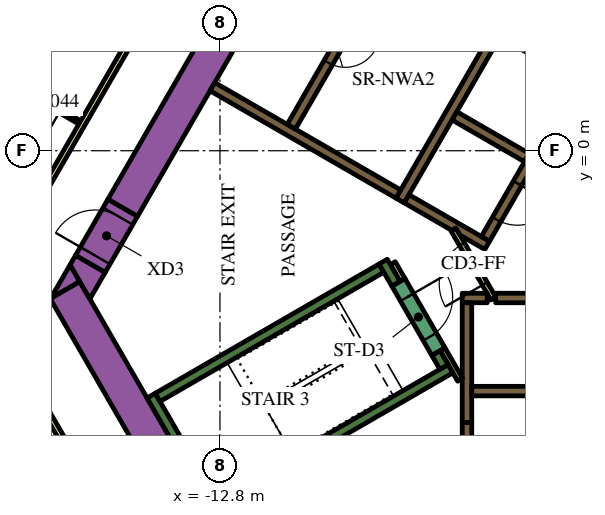
"""IFC4 building model, lengths in metres.
Left out: names, types, materials, properties, quantities, classifications, styles, units other than length and angle.
Written with IfcOpenShell. Run it as: python <this file> out.ifc"""

import sys

from ifc_helpers import new_model, si_unit, direction, frame, frame_2d, origin, place, context, subcontext, project, spatial, polyline, rectangle, outline, extrude, element, fill, save


model = new_model("IFC4")
c1 = context("Model", 3, precision=1e-05, world=origin(), true_north=direction((0.0, 1.0)))
c2 = subcontext(c1, "Body", "Model", "MODEL_VIEW")
j1 = project(units=[si_unit("LENGTHUNIT", "METRE"), si_unit("PLANEANGLEUNIT", "RADIAN")], contexts=[c1])
p1 = place(None, origin())
s1 = spatial("IfcSite", under=j1, at=p1, CompositionType="ELEMENT")
p2 = place(p1, origin())
s2 = spatial("IfcBuilding", under=s1, at=p2, CompositionType="ELEMENT")
p3 = place(p2, frame((0.0, 0.0, 95.4)))
s3 = spatial("IfcBuildingStorey", under=s2, at=p3, CompositionType="ELEMENT", Elevation=95.4)
p4 = place(p3, frame((-15.36, -1.503, 0.0), z_axis=(0.0, 0.0, 1.0), x_axis=(0.50000389221, 0.866023156604, 0.0)))
e1 = element("IfcWall", 1, at=p4, inside=s3, PredefinedType="SOLIDWALL", context=c2, shape_type="SweptSolid", body=[
    extrude(rectangle(XDim=21.0, YDim=0.9, at=frame_2d((10.5, 0.0))), origin(), (0.0, 0.0, 1.0), 3.9),
])
p5 = place(p3, frame((-12.134, -11.883, 0.0), z_axis=(0.0, 0.0, 1.0), x_axis=(-0.500005339912, 0.866022320763, 0.0)))
e2 = element("IfcWall", 2, at=p5, inside=s3, PredefinedType="SOLIDWALL", context=c2, shape_type="SweptSolid", body=[
    extrude(rectangle(XDim=9.488, YDim=0.9, at=frame_2d((4.744, 0.0))), origin(), (0.0, 0.0, 1.0), 3.9),
])
p6 = place(p3, origin())
e3 = element("IfcWall", 3, at=p6, inside=s3, PredefinedType="SOLIDWALL", context=c2, shape_type="SweptSolid", body=[
    extrude(outline(polyline([(-16.489, -3.44), (-17.251, -3.88), (-16.743, -3.0), (-16.489, -3.44)])), origin(), (0.0, 0.0, 1.0), 3.9),
])
e4 = element("IfcWall", 4, at=p6, inside=s3, PredefinedType="SOLIDWALL", context=c2, shape_type="SweptSolid", body=[
    extrude(outline(polyline([(-15.82, -3.201), (-16.223, -3.9), (-16.743, -3.0), (-16.599, -2.751), (-15.82, -3.201)])), origin(), (0.0, 0.0, 1.0), 3.9),
])
p7 = place(p3, frame((-12.885, -9.431, 0.0), z_axis=(0.0, 0.0, 1.0), x_axis=(-0.500020560727, 0.866013532718, 0.0)))
e5 = element("IfcWall", 5, at=p7, inside=s3, PredefinedType="SOLIDWALL", context=c2, shape_type="SweptSolid", body=[
    extrude(rectangle(XDim=3.45, YDim=0.25, at=frame_2d((1.725, 0.0))), origin(), (0.0, 0.0, 1.0), 3.9),
])
p8 = place(p3, frame((-14.44, -6.49, 0.0), z_axis=(0.0, 0.0, 1.0), x_axis=(0.866022966069, 0.500004222222, 0.0)))
e6 = element("IfcWall", 6, at=p8, inside=s3, PredefinedType="SOLIDWALL", context=c2, shape_type="SweptSolid", body=[
    extrude(rectangle(XDim=6.8, YDim=0.25, at=frame_2d((3.4, 0.0))), origin(), (0.0, 0.0, 1.0), 3.9),
])
p9 = place(p3, frame((-8.168, -3.503, 0.0), z_axis=(0.0, 0.0, 1.0), x_axis=(-0.499952099219, 0.866053057547, 0.0)))
e7 = element("IfcWall", 7, at=p9, inside=s3, PredefinedType="SOLIDWALL", context=c2, shape_type="SweptSolid", body=[
    extrude(rectangle(XDim=0.675, YDim=0.25, at=frame_2d((0.337, 0.0))), origin(), (0.0, 0.0, 1.0), 3.9),
])
p10 = place(p3, frame((-12.84, -9.261, 0.0), z_axis=(0.0, 0.0, 1.0), x_axis=(0.866016039709, 0.500016218704, 0.0)))
e8 = element("IfcWall", 8, at=p10, inside=s3, PredefinedType="SOLIDWALL", context=c2, shape_type="SweptSolid", body=[
    extrude(rectangle(XDim=7.05, YDim=0.25, at=frame_2d((3.525, 0.0))), origin(), (0.0, 0.0, 1.0), 3.9),
])
p11 = place(p3, frame((-6.905, -5.69, 0.0), z_axis=(0.0, 0.0, 1.0), x_axis=(-0.500402024738, 0.865793170242, 0.0)))
e9 = element("IfcWall", 9, at=p11, inside=s3, PredefinedType="SOLIDWALL", context=c2, shape_type="SweptSolid", body=[
    extrude(rectangle(XDim=0.425, YDim=0.25, at=frame_2d((0.212, 0.0))), origin(), (0.0, 0.0, 1.0), 3.9),
])
p12 = place(p3, frame((-5.545, -3.875, 0.0), z_axis=(0.0, 0.0, 1.0), x_axis=(1.0, 0.0, 0.0)))
e10 = element("IfcWall", 10, at=p12, inside=s3, PredefinedType="SOLIDWALL", context=c2, shape_type="SweptSolid", body=[
    extrude(rectangle(XDim=11.97, YDim=0.25, at=frame_2d((5.985, 0.0))), origin(), (0.0, 0.0, 1.0), 3.9),
])
p13 = place(p3, frame((-6.425, -3.875, 0.0), z_axis=(0.0, 0.0, 1.0), x_axis=(1.0, 0.0, 0.0)))
e11 = element("IfcWall", 11, at=p13, inside=s3, PredefinedType="SOLIDWALL", context=c2, shape_type="SweptSolid", body=[
    extrude(rectangle(XDim=0.658, YDim=0.25, at=frame_2d((0.329, 0.0))), origin(), (0.0, 0.0, 1.0), 3.9),
])
p14 = place(p3, frame((-6.3, -4.0, 0.0), z_axis=(0.0, 0.0, 1.0), x_axis=(0.0, -1.0, 0.0)))
e12 = element("IfcWall", 12, at=p14, inside=s3, PredefinedType="SOLIDWALL", context=c2, shape_type="SweptSolid", body=[
    extrude(rectangle(XDim=3.154, YDim=0.25, at=frame_2d((1.577, 0.0))), origin(), (0.0, 0.0, 1.0), 3.9),
])
p15 = place(p3, frame((-8.06, -1.311, 0.0), z_axis=(0.0, 0.0, 1.0), x_axis=(0.50000273126, 0.866023826885, 0.0)))
e13 = element("IfcWall", 13, at=p15, inside=s3, PredefinedType="SOLIDWALL", context=c2, shape_type="SweptSolid", body=[
    extrude(rectangle(XDim=10.33, YDim=0.25, at=frame_2d((5.165, 0.0))), origin(), (0.0, 0.0, 1.0), 3.9),
])
for number, where, z_axis, x_axis in (
    (14, (-5.369, 3.1, 0.0), (0.0, 0.0, 1.0), (0.866, -0.5, 0.0)),
    (15, (-4.724, -0.182, 0.0), (0.0, 0.0, 1.0), (-0.866, 0.5, 0.0)),
):
    element("IfcWall", number, at=place(p3, frame(where, z_axis=z_axis, x_axis=x_axis)), inside=s3, PredefinedType="SOLIDWALL", context=c2, shape_type="SweptSolid", body=[
        extrude(rectangle(XDim=2.2, YDim=0.25, at=frame_2d((1.1, 0.0))), origin(), (0.0, 0.0, 1.0), 3.9),
    ])
e16 = element("IfcWall", 16, at=p6, inside=s3, PredefinedType="SOLIDWALL", context=c2, shape_type="SweptSolid", body=[
    extrude(outline(polyline([(-5.922, -2.257), (-5.922, -2.257), (-5.705, -2.382), (-5.83, -2.598), (-6.483, -2.221), (-6.591, -2.033), (-6.591, -2.033), (-6.7, -2.096), (-7.952, -1.373), (-7.827, -1.156), (-5.922, -2.257)])), origin(), (0.0, 0.0, 1.0), 3.9),
])
p16 = place(p3, frame((-8.106, -1.14, 0.0), z_axis=(0.0, 0.0, 1.0), x_axis=(-0.866000643155, 0.500042884217, 0.0)))
e17 = element("IfcWall", 17, at=p16, inside=s3, PredefinedType="SOLIDWALL", context=c2, shape_type="SweptSolid", body=[
    extrude(rectangle(XDim=5.65, YDim=0.25, at=frame_2d((2.825, 0.0))), origin(), (0.0, 0.0, 1.0), 3.9),
])
p17 = place(p3, frame((-6.48, -6.027, 0.0), z_axis=(0.0, 0.0, 1.0), x_axis=(-0.499927229454, 0.866067413802, 0.0)))
e18 = element("IfcWall", 18, at=p17, inside=s3, PredefinedType="PARTITIONING", context=c2, shape_type="SweptSolid", body=[
    extrude(rectangle(XDim=0.929, YDim=0.15, at=frame_2d((0.464, 0.0))), origin(), (0.0, 0.0, 1.0), 3.9),
])
p18 = place(p3, frame((-8.252, -2.958, 0.0), z_axis=(0.0, 0.0, 1.0), x_axis=(0.500174715838, -0.865924508047, 0.0)))
e19 = element("IfcWall", 19, at=p18, inside=s3, PredefinedType="PARTITIONING", context=c2, shape_type="SweptSolid", body=[
    extrude(rectangle(XDim=0.514, YDim=0.15, at=frame_2d((0.257, 0.0))), origin(), (0.0, 0.0, 1.0), 2.75),
])
p19 = place(p3, frame((-6.175, -6.325, 0.0), z_axis=(0.0, 0.0, 1.0), x_axis=(1.0, 0.0, 0.0)))
e20 = element("IfcWall", 20, at=p19, inside=s3, PredefinedType="SOLIDWALL", context=c2, shape_type="SweptSolid", body=[
    extrude(rectangle(XDim=12.35, YDim=0.25, at=frame_2d((6.175, 0.0))), origin(), (0.0, 0.0, 1.0), 3.9),
])
p20 = place(p19, frame((3.205, 0.0, 0.0)))
e21 = element("IfcOpeningElement", 21, at=p20, cuts=e20, PredefinedType="OPENING", context=c2, shape_type="SweptSolid", body=[
    extrude(rectangle(XDim=0.9, YDim=2.1, at=frame_2d((0.45, 1.05))), frame((0.0, 0.135, 0.0), z_axis=(0.0, -1.0, 0.0), x_axis=(1.0, 0.0, 0.0)), (0.0, 0.0, 1.0), 0.27),
])
p21 = place(p19, frame((8.145, 0.0, 0.0)))
e22 = element("IfcOpeningElement", 22, at=p21, cuts=e20, PredefinedType="OPENING", context=c2, shape_type="SweptSolid", body=[
    extrude(rectangle(XDim=1.1, YDim=2.1, at=frame_2d((0.55, 1.05))), frame((0.0, 0.135, 0.0), z_axis=(0.0, -1.0, 0.0), x_axis=(1.0, 0.0, 0.0)), (0.0, 0.0, 1.0), 0.27),
])
p22 = place(p19, frame((10.665, 0.0, 0.0)))
e23 = element("IfcOpeningElement", 23, at=p22, cuts=e20, PredefinedType="OPENING", context=c2, shape_type="SweptSolid", body=[
    extrude(rectangle(XDim=1.1, YDim=2.1, at=frame_2d((0.55, 1.05))), frame((0.0, 0.135, 0.0), z_axis=(0.0, -1.0, 0.0), x_axis=(1.0, 0.0, 0.0)), (0.0, 0.0, 1.0), 0.27),
])
p23 = place(p3, frame((-6.008, 9.144, 0.0), z_axis=(0.0, 0.0, 1.0), x_axis=(-0.500006956611, -0.866021387346, 0.0)))
e24 = element("IfcWall", 24, at=p23, inside=s3, PredefinedType="SOLIDWALL", context=c2, shape_type="SweptSolid", body=[
    extrude(rectangle(XDim=9.83, YDim=0.25, at=frame_2d((4.915, 0.0))), origin(), (0.0, 0.0, 1.0), 3.9),
])
p24 = place(p23, frame((6.985, 0.0, 0.0)))
e25 = element("IfcOpeningElement", 25, at=p24, cuts=e24, PredefinedType="OPENING", context=c2, shape_type="SweptSolid", body=[
    extrude(rectangle(XDim=0.9, YDim=2.1, at=frame_2d((0.45, 1.05))), frame((0.0, 0.135, 0.0), z_axis=(0.0, -1.0, 0.0), x_axis=(1.0, 0.0, 0.0)), (0.0, 0.0, 1.0), 0.27),
])
p25 = place(p3, frame((-0.898, 6.194, 0.0), z_axis=(0.0, 0.0, 1.0), x_axis=(-0.499996202215, -0.866027596426, 0.0)))
e26 = element("IfcWall", 26, at=p25, inside=s3, PredefinedType="SOLIDWALL", context=c2, shape_type="SweptSolid", body=[
    extrude(rectangle(XDim=9.83, YDim=0.25, at=frame_2d((4.915, 0.0))), origin(), (0.0, 0.0, 1.0), 3.9),
])
p26 = place(p25, frame((0.585, 0.0, 0.0)))
e27 = element("IfcOpeningElement", 27, at=p26, cuts=e26, PredefinedType="OPENING", context=c2, shape_type="SweptSolid", body=[
    extrude(rectangle(XDim=1.1, YDim=2.1, at=frame_2d((0.55, 1.05))), frame((0.0, 0.135, 0.0), z_axis=(0.0, -1.0, 0.0), x_axis=(1.0, 0.0, 0.0)), (0.0, 0.0, 1.0), 0.27),
])
p27 = place(p25, frame((3.105, 0.0, 0.0)))
e28 = element("IfcOpeningElement", 28, at=p27, cuts=e26, PredefinedType="OPENING", context=c2, shape_type="SweptSolid", body=[
    extrude(rectangle(XDim=1.1, YDim=2.1, at=frame_2d((0.55, 1.05))), frame((0.0, 0.135, 0.0), z_axis=(0.0, -1.0, 0.0), x_axis=(1.0, 0.0, 0.0)), (0.0, 0.0, 1.0), 0.27),
])
p28 = place(p25, frame((5.625, 0.0, 0.0)))
e29 = element("IfcOpeningElement", 29, at=p28, cuts=e26, PredefinedType="OPENING", context=c2, shape_type="SweptSolid", body=[
    extrude(rectangle(XDim=1.1, YDim=2.1, at=frame_2d((0.55, 1.05))), frame((0.0, 0.135, 0.0), z_axis=(0.0, -1.0, 0.0), x_axis=(1.0, 0.0, 0.0)), (0.0, 0.0, 1.0), 0.27),
])
p29 = place(p25, frame((8.145, 0.0, 0.0)))
e30 = element("IfcOpeningElement", 30, at=p29, cuts=e26, PredefinedType="OPENING", context=c2, shape_type="SweptSolid", body=[
    extrude(rectangle(XDim=1.1, YDim=2.1, at=frame_2d((0.55, 1.05))), frame((0.0, 0.135, 0.0), z_axis=(0.0, -1.0, 0.0), x_axis=(1.0, 0.0, 0.0)), (0.0, 0.0, 1.0), 0.27),
])
p30 = place(p3, frame((-8.103, -3.466, 0.0), z_axis=(0.0, 0.0, 1.0), x_axis=(0.500078061341, -0.865980330357, 0.0)))
e31 = element("IfcWall", 31, at=p30, inside=s3, PredefinedType="SOLIDWALL", context=c2, shape_type="SweptSolid", body=[
    extrude(rectangle(XDim=2.1, YDim=0.4, at=frame_2d((1.05, 0.0))), origin(), (0.0, 0.0, 1.0), 3.9),
])
p31 = place(p30, frame((0.45, 0.0, 0.0)))
e32 = element("IfcOpeningElement", 32, at=p31, cuts=e31, PredefinedType="OPENING", context=c2, shape_type="SweptSolid", body=[
    extrude(rectangle(XDim=1.2, YDim=2.1, at=frame_2d((0.6, 1.05))), frame((0.0, 0.21, 0.0), z_axis=(0.0, -1.0, 0.0), x_axis=(1.0, 0.0, 0.0)), (0.0, 0.0, 1.0), 0.42),
])
p32 = place(p3, frame((-6.3, -7.154, 0.0), z_axis=(0.0, 0.0, 1.0), x_axis=(0.0, -1.0, 0.0)))
e33 = element("IfcWall", 33, at=p32, inside=s3, PredefinedType="SOLIDWALL", context=c2, shape_type="SweptSolid", body=[
    extrude(rectangle(XDim=1.8, YDim=0.25, at=frame_2d((0.9, 0.0))), origin(), (0.0, 0.0, 1.0), 3.9),
])
p33 = place(p32, frame((0.45, 0.0, 0.0)))
e34 = element("IfcOpeningElement", 34, at=p33, cuts=e33, PredefinedType="OPENING", context=c2, shape_type="SweptSolid", body=[
    extrude(rectangle(XDim=0.9, YDim=2.1, at=frame_2d((0.45, 1.05))), frame((0.0, 0.135, 0.0), z_axis=(0.0, -1.0, 0.0), x_axis=(1.0, 0.0, 0.0)), (0.0, 0.0, 1.0), 0.27),
])
p34 = place(p3, frame((-5.606, -3.89, 0.0), z_axis=(0.0, 0.0, 1.0), x_axis=(-0.500027713859, 0.866009402589, 0.0)))
e35 = element("IfcWall", 35, at=p34, inside=s3, PredefinedType="PARTITIONING", context=c2, shape_type="SweptSolid", body=[
    extrude(rectangle(XDim=2.1, YDim=0.15, at=frame_2d((1.05, 0.0))), origin(), (0.0, 0.0, 1.0), 2.75),
])
p35 = place(p34, frame((0.45, 0.0, 0.0)))
e36 = element("IfcOpeningElement", 36, at=p35, cuts=e35, PredefinedType="OPENING", context=c2, shape_type="SweptSolid", body=[
    extrude(rectangle(XDim=1.2, YDim=2.1, at=frame_2d((0.6, 1.05))), frame((0.0, 0.085, 0.0), z_axis=(0.0, -1.0, 0.0), x_axis=(1.0, 0.0, 0.0)), (0.0, 0.0, 1.0), 0.17),
])
p36 = place(p3, frame((-16.209, -2.976, 0.0), z_axis=(0.0, 0.0, 1.0), x_axis=(0.499954529098, 0.86605165483, 0.0)))
e37 = element("IfcWall", 37, at=p36, inside=s3, PredefinedType="SOLIDWALL", context=c2, shape_type="SweptSolid", body=[
    extrude(rectangle(XDim=1.7, YDim=0.9, at=frame_2d((0.85, 0.0))), origin(), (0.0, 0.0, 1.0), 3.9),
])
p37 = place(p36, frame((0.25, 0.0, 0.0)))
e38 = element("IfcOpeningElement", 38, at=p37, cuts=e37, PredefinedType="OPENING", context=c2, shape_type="SweptSolid", body=[
    extrude(rectangle(XDim=1.2, YDim=2.1, at=frame_2d((0.6, 1.05))), frame((0.0, 0.46, 0.0), z_axis=(0.0, -1.0, 0.0), x_axis=(1.0, 0.0, 0.0)), (0.0, 0.0, 1.0), 0.92),
])
p38 = place(p3, frame((-19.081, -3.9, 0.0), z_axis=(0.0, 0.0, 1.0), x_axis=(0.499998313975, 0.866026377209, 0.0)))
e39 = element("IfcWall", 39, at=p38, inside=s3, PredefinedType="PARTITIONING", context=c2, shape_type="SweptSolid", body=[
    extrude(rectangle(XDim=25.766, YDim=0.15, at=frame_2d((12.883, 0.0))), origin(), (0.0, 0.0, 1.0), 2.75),
])
p39 = place(p38, frame((19.306, 0.0, 0.0)))
e40 = element("IfcOpeningElement", 40, at=p39, cuts=e39, PredefinedType="OPENING", context=c2, shape_type="SweptSolid", body=[
    extrude(rectangle(XDim=1.0, YDim=2.1, at=frame_2d((0.5, 1.05))), frame((0.0, 0.085, 0.0), z_axis=(0.0, -1.0, 0.0), x_axis=(1.0, 0.0, 0.0)), (0.0, 0.0, 1.0), 0.17),
])
p40 = place(p38, frame((17.144, 0.0, 0.0)))
e41 = element("IfcOpeningElement", 41, at=p40, cuts=e39, PredefinedType="OPENING", context=c2, shape_type="SweptSolid", body=[
    extrude(rectangle(XDim=0.9, YDim=2.1, at=frame_2d((0.45, 1.05))), frame((0.0, 0.085, 0.0), z_axis=(0.0, -1.0, 0.0), x_axis=(1.0, 0.0, 0.0)), (0.0, 0.0, 1.0), 0.17),
])
p41 = place(p38, frame((9.955, 0.0, 0.0)))
e42 = element("IfcOpeningElement", 42, at=p41, cuts=e39, PredefinedType="OPENING", context=c2, shape_type="SweptSolid", body=[
    extrude(rectangle(XDim=1.1, YDim=2.1, at=frame_2d((0.55, 1.05))), frame((0.0, 0.085, 0.0), z_axis=(0.0, -1.0, 0.0), x_axis=(1.0, 0.0, 0.0)), (0.0, 0.0, 1.0), 0.17),
])
p42 = place(p38, frame((8.648, 0.0, 0.0)))
e43 = element("IfcOpeningElement", 43, at=p42, cuts=e39, PredefinedType="OPENING", context=c2, shape_type="SweptSolid", body=[
    extrude(rectangle(XDim=1.0, YDim=2.1, at=frame_2d((0.5, 1.05))), frame((0.0, 0.085, 0.0), z_axis=(0.0, -1.0, 0.0), x_axis=(1.0, 0.0, 0.0)), (0.0, 0.0, 1.0), 0.17),
])
p43 = place(p38, frame((1.553, 0.0, 0.0)))
e44 = element("IfcOpeningElement", 44, at=p43, cuts=e39, PredefinedType="OPENING", context=c2, shape_type="SweptSolid", body=[
    extrude(rectangle(XDim=0.9, YDim=2.1, at=frame_2d((0.45, 1.05))), frame((0.0, 0.085, 0.0), z_axis=(0.0, -1.0, 0.0), x_axis=(1.0, 0.0, 0.0)), (0.0, 0.0, 1.0), 0.17),
])
p44 = place(p3, frame((-16.412, -8.523, 0.0), z_axis=(0.0, 0.0, 1.0), x_axis=(-0.500001929737, 0.866024289647, 0.0)))
e45 = element("IfcWall", 45, at=p44, inside=s3, PredefinedType="PARTITIONING", context=c2, shape_type="SweptSolid", body=[
    extrude(rectangle(XDim=5.268, YDim=0.15, at=frame_2d((2.634, 0.0))), origin(), (0.0, 0.0, 1.0), 2.75),
])
p45 = place(p44, frame((4.088, 0.0, 0.0)))
e46 = element("IfcOpeningElement", 46, at=p45, cuts=e45, PredefinedType="OPENING", context=c2, shape_type="SweptSolid", body=[
    extrude(rectangle(XDim=1.0, YDim=2.1, at=frame_2d((0.5, 1.05))), frame((0.0, 0.085, 0.0), z_axis=(0.0, -1.0, 0.0), x_axis=(1.0, 0.0, 0.0)), (0.0, 0.0, 1.0), 0.17),
])
p46 = place(p3, frame((-16.487, 0.743, 0.0), z_axis=(0.0, 0.0, 1.0), x_axis=(-0.866021400173, 0.500006934395, 0.0)))
e47 = element("IfcWall", 47, at=p46, inside=s3, PredefinedType="PARTITIONING", context=c2, shape_type="SweptSolid", body=[
    extrude(rectangle(XDim=2.6, YDim=0.1, at=frame_2d((1.3, 0.0))), origin(), (0.0, 0.0, 1.0), 2.75),
])
p47 = place(p46, frame((0.6, 0.0, 0.0)))
e48 = element("IfcOpeningElement", 48, at=p47, cuts=e47, PredefinedType="OPENING", context=c2, shape_type="SweptSolid", body=[
    extrude(rectangle(XDim=0.9, YDim=2.1, at=frame_2d((0.45, 1.05))), frame((0.0, 0.06, 0.0), z_axis=(0.0, -1.0, 0.0), x_axis=(1.0, 0.0, 0.0)), (0.0, 0.0, 1.0), 0.12),
])
p48 = place(p24, origin())
e49 = element("IfcDoor", 49, at=p48, inside=s3, OperationType="SINGLE_SWING_LEFT", PredefinedType="DOOR", context=c2, shape_type="SweptSolid", body=[
    extrude(rectangle(XDim=0.9, YDim=2.1, at=frame_2d((0.45, 1.05))), frame((0.0, 0.025, 0.0), z_axis=(0.0, -1.0, 0.0), x_axis=(1.0, 0.0, 0.0)), (0.0, 0.0, 1.0), 0.05),
])
fill(e25, e49)
p49 = place(p29, origin())
e50 = element("IfcDoor", 50, at=p49, inside=s3, OperationType="DOUBLE_DOOR_SLIDING", PredefinedType="DOOR", context=c2, shape_type="SweptSolid", body=[
    extrude(rectangle(XDim=1.1, YDim=2.1, at=frame_2d((0.55, 1.05))), frame((0.0, 0.025, 0.0), z_axis=(0.0, -1.0, 0.0), x_axis=(1.0, 0.0, 0.0)), (0.0, 0.0, 1.0), 0.05),
])
fill(e30, e50)
p50 = place(p31, origin())
e51 = element("IfcDoor", 51, at=p50, inside=s3, OperationType="SINGLE_SWING_LEFT", PredefinedType="DOOR", context=c2, shape_type="SweptSolid", body=[
    extrude(rectangle(XDim=1.2, YDim=2.1, at=frame_2d((0.6, 1.05))), frame((0.0, 0.025, 0.0), z_axis=(0.0, -1.0, 0.0), x_axis=(1.0, 0.0, 0.0)), (0.0, 0.0, 1.0), 0.05),
])
fill(e32, e51)
p51 = place(p35, origin())
e52 = element("IfcDoor", 52, at=p51, inside=s3, OperationType="SINGLE_SWING_LEFT", PredefinedType="DOOR", context=c2, shape_type="SweptSolid", body=[
    extrude(rectangle(XDim=1.2, YDim=2.1, at=frame_2d((0.6, 1.05))), frame((0.0, 0.025, 0.0), z_axis=(0.0, -1.0, 0.0), x_axis=(1.0, 0.0, 0.0)), (0.0, 0.0, 1.0), 0.05),
])
fill(e36, e52)
p52 = place(p37, origin())
e53 = element("IfcDoor", 53, at=p52, inside=s3, OperationType="SINGLE_SWING_LEFT", PredefinedType="DOOR", context=c2, shape_type="SweptSolid", body=[
    extrude(rectangle(XDim=1.2, YDim=2.1, at=frame_2d((0.6, 1.05))), frame((0.0, 0.025, 0.0), z_axis=(0.0, -1.0, 0.0), x_axis=(1.0, 0.0, 0.0)), (0.0, 0.0, 1.0), 0.05),
])
fill(e38, e53)
p53 = place(p47, origin())
e54 = element("IfcDoor", 54, at=p53, inside=s3, OperationType="SINGLE_SWING_LEFT", PredefinedType="DOOR", context=c2, shape_type="SweptSolid", body=[
    extrude(rectangle(XDim=0.9, YDim=2.1, at=frame_2d((0.45, 1.05))), frame((0.0, 0.025, 0.0), z_axis=(0.0, -1.0, 0.0), x_axis=(1.0, 0.0, 0.0)), (0.0, 0.0, 1.0), 0.05),
])
fill(e48, e54)
save(model, sys.argv[1])
